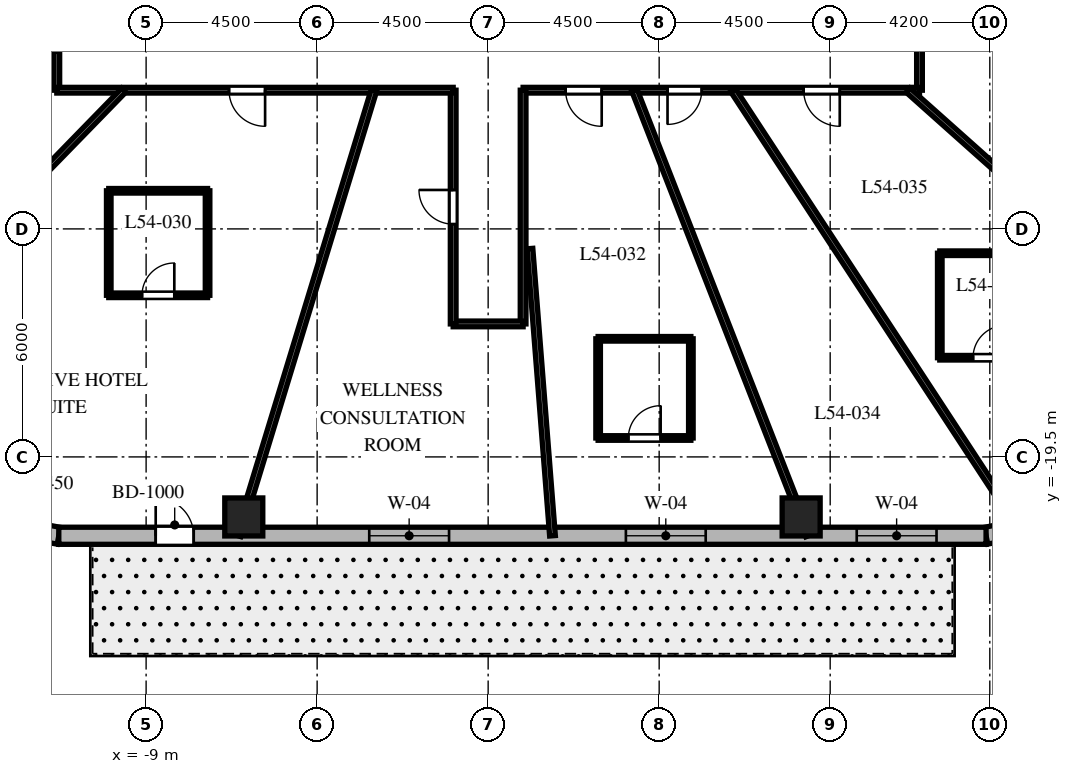
"""IFC4 building model, lengths in metres.
Left out: names, types, materials, properties, quantities, classifications, styles, units other than length and angle.
Written with IfcOpenShell. Run it as: python <this file> out.ifc"""

import sys

from ifc_helpers import new_model, si_unit, direction, frame, frame_2d, origin, origin_2d, place, context, subcontext, project, spatial, rectangle, extrude, element, fill, save


model = new_model("IFC4")
c1 = context("Model", 3, precision=1e-05, world=origin(), true_north=direction((0.0, 1.0)))
c2 = subcontext(c1, "Body", "Model", "MODEL_VIEW")
j1 = project(units=[si_unit("LENGTHUNIT", "METRE"), si_unit("PLANEANGLEUNIT", "RADIAN")], contexts=[c1])
p1 = place(None, origin())
s1 = spatial("IfcSite", under=j1, at=p1, CompositionType="ELEMENT")
p2 = place(p1, origin())
s2 = spatial("IfcBuilding", under=s1, at=p2, CompositionType="ELEMENT")
p3 = place(p2, frame((0.0, 0.0, 217.9)))
s3 = spatial("IfcBuildingStorey", under=s2, at=p3, CompositionType="ELEMENT", Elevation=217.9)
for number, where, z_axis, x_axis in (
    (1, (-6.43, -21.08, 0.0), (0.0, 0.0, 1.0), (1.0, 0.0, 0.0)),
    (2, (8.236, -21.08, 0.0), (0.0, 0.0, 1.0), (1.0, 0.0, 0.0)),
):
    element("IfcColumn", number, at=place(p3, frame(where, z_axis=z_axis, x_axis=x_axis)), inside=s3, PredefinedType="COLUMN", context=c2, shape_type="SweptSolid", body=[
        extrude(rectangle(XDim=1.0, YDim=1.0, at=origin_2d()), origin(), (0.0, 0.0, 1.0), 3.8),
    ])
p4 = place(p3, frame((-12.546, -21.34, 0.0), z_axis=(0.0, 0.0, 1.0), x_axis=(0.982686750835, -0.18527479519, 0.0)))
e3 = element("IfcWall", 3, at=p4, inside=s3, PredefinedType="SOLIDWALL", context=c2, shape_type="SweptSolid", body=[
    extrude(rectangle(XDim=1.27, YDim=0.45, at=frame_2d((0.635, 0.0))), origin(), (0.0, 0.0, 1.0), 3.5),
])
p5 = place(p3, frame((13.102, -21.575, 0.0), z_axis=(0.0, 0.0, 1.0), x_axis=(0.978757421505, 0.205021730188, 0.0)))
e4 = element("IfcWall", 4, at=p5, inside=s3, PredefinedType="SOLIDWALL", context=c2, shape_type="SweptSolid", body=[
    extrude(rectangle(XDim=1.406, YDim=0.45, at=frame_2d((0.703, 0.0))), origin(), (0.0, 0.0, 1.0), 3.5),
])
p6 = place(p3, frame((-11.298, -21.575, 0.0), z_axis=(0.0, 0.0, 1.0), x_axis=(1.0, 0.0, 0.0)))
e5 = element("IfcWall", 5, at=p6, inside=s3, PredefinedType="SOLIDWALL", context=c2, shape_type="SweptSolid", body=[
    extrude(rectangle(XDim=24.399, YDim=0.45, at=frame_2d((12.2, 0.0))), origin(), (0.0, 0.0, 1.0), 3.5),
])
p7 = place(p6, frame((2.55, 0.0, 0.0)))
e6 = element("IfcOpeningElement", 6, at=p7, cuts=e5, PredefinedType="OPENING", context=c2, shape_type="SweptSolid", body=[
    extrude(rectangle(XDim=1.0, YDim=2.15, at=frame_2d((0.5, 1.075))), frame((0.0, 0.235, 0.0), z_axis=(0.0, -1.0, 0.0), x_axis=(1.0, 0.0, 0.0)), (0.0, 0.0, 1.0), 0.47),
])
p8 = place(p6, frame((8.169, 0.0, 0.8)))
e7 = element("IfcOpeningElement", 7, at=p8, cuts=e5, PredefinedType="OPENING", context=c2, shape_type="SweptSolid", body=[
    extrude(rectangle(XDim=2.1, YDim=1.85, at=frame_2d((1.05, 0.925))), frame((0.0, 0.235, 0.0), z_axis=(0.0, -1.0, 0.0), x_axis=(1.0, 0.0, 0.0)), (0.0, 0.0, 1.0), 0.47),
])
p9 = place(p6, frame((14.922, 0.0, 0.8)))
e8 = element("IfcOpeningElement", 8, at=p9, cuts=e5, PredefinedType="OPENING", context=c2, shape_type="SweptSolid", body=[
    extrude(rectangle(XDim=2.1, YDim=1.85, at=frame_2d((1.05, 0.925))), frame((0.0, 0.235, 0.0), z_axis=(0.0, -1.0, 0.0), x_axis=(1.0, 0.0, 0.0)), (0.0, 0.0, 1.0), 0.47),
])
p10 = place(p6, frame((20.996, 0.0, 0.8)))
e9 = element("IfcOpeningElement", 9, at=p10, cuts=e5, PredefinedType="OPENING", context=c2, shape_type="SweptSolid", body=[
    extrude(rectangle(XDim=2.1, YDim=1.85, at=frame_2d((1.05, 0.925))), frame((0.0, 0.235, 0.0), z_axis=(0.0, -1.0, 0.0), x_axis=(1.0, 0.0, 0.0)), (0.0, 0.0, 1.0), 0.47),
])
p11 = place(p3, frame((-11.35, -9.85, 0.0), z_axis=(0.0, 0.0, 1.0), x_axis=(0.0, 1.0, 0.0)))
e10 = element("IfcWall", 10, at=p11, inside=s3, PredefinedType="PARTITIONING", context=c2, shape_type="SweptSolid", body=[
    extrude(rectangle(XDim=12.4, YDim=0.15, at=frame_2d((6.2, 0.0))), origin(), (0.0, 0.0, 1.0), 2.99),
])
p12 = place(p11, frame((10.017, 0.0, 0.0)))
e11 = element("IfcOpeningElement", 11, at=p12, cuts=e10, PredefinedType="OPENING", context=c2, shape_type="SweptSolid", body=[
    extrude(rectangle(XDim=0.9, YDim=2.03, at=frame_2d((0.45, 1.015))), frame((0.0, 0.085, 0.0), z_axis=(0.0, -1.0, 0.0), x_axis=(1.0, 0.0, 0.0)), (0.0, 0.0, 1.0), 0.17),
])
p13 = place(p11, frame((7.427, 0.0, 0.0)))
e12 = element("IfcOpeningElement", 12, at=p13, cuts=e10, PredefinedType="OPENING", context=c2, shape_type="SweptSolid", body=[
    extrude(rectangle(XDim=0.9, YDim=2.03, at=frame_2d((0.45, 1.015))), frame((0.0, 0.085, 0.0), z_axis=(0.0, -1.0, 0.0), x_axis=(1.0, 0.0, 0.0)), (0.0, 0.0, 1.0), 0.17),
])
p14 = place(p11, frame((3.01, 0.0, 0.0)))
e13 = element("IfcOpeningElement", 13, at=p14, cuts=e10, PredefinedType="OPENING", context=c2, shape_type="SweptSolid", body=[
    extrude(rectangle(XDim=0.95, YDim=2.03, at=frame_2d((0.475, 1.015))), frame((0.0, 0.085, 0.0), z_axis=(0.0, -1.0, 0.0), x_axis=(1.0, 0.0, 0.0)), (0.0, 0.0, 1.0), 0.17),
])
p15 = place(p3, frame((11.35, -4.4, 0.0), z_axis=(0.0, 0.0, 1.0), x_axis=(0.0, -1.0, 0.0)))
e14 = element("IfcWall", 14, at=p15, inside=s3, PredefinedType="PARTITIONING", context=c2, shape_type="SweptSolid", body=[
    extrude(rectangle(XDim=5.45, YDim=0.15, at=frame_2d((2.725, 0.0))), origin(), (0.0, 0.0, 1.0), 2.99),
])
p16 = place(p3, frame((11.35, -9.85, 0.0), z_axis=(0.0, 0.0, 1.0), x_axis=(-1.0, 0.0, 0.0)))
e15 = element("IfcWall", 15, at=p16, inside=s3, PredefinedType="PARTITIONING", context=c2, shape_type="SweptSolid", body=[
    extrude(rectangle(XDim=10.43, YDim=0.15, at=frame_2d((5.215, 0.0))), origin(), (0.0, 0.0, 1.0), 2.99),
])
p17 = place(p16, frame((8.362, 0.0, 0.0)))
e16 = element("IfcOpeningElement", 16, at=p17, cuts=e15, PredefinedType="OPENING", context=c2, shape_type="SweptSolid", body=[
    extrude(rectangle(XDim=0.95, YDim=2.03, at=frame_2d((0.475, 1.015))), frame((0.0, 0.085, 0.0), z_axis=(0.0, -1.0, 0.0), x_axis=(1.0, 0.0, 0.0)), (0.0, 0.0, 1.0), 0.17),
])
p18 = place(p16, frame((5.73, 0.0, 0.0)))
e17 = element("IfcOpeningElement", 17, at=p18, cuts=e15, PredefinedType="OPENING", context=c2, shape_type="SweptSolid", body=[
    extrude(rectangle(XDim=0.9, YDim=2.03, at=frame_2d((0.45, 1.015))), frame((0.0, 0.085, 0.0), z_axis=(0.0, -1.0, 0.0), x_axis=(1.0, 0.0, 0.0)), (0.0, 0.0, 1.0), 0.17),
])
p19 = place(p16, frame((2.098, 0.0, 0.0)))
e18 = element("IfcOpeningElement", 18, at=p19, cuts=e15, PredefinedType="OPENING", context=c2, shape_type="SweptSolid", body=[
    extrude(rectangle(XDim=0.95, YDim=2.03, at=frame_2d((0.475, 1.015))), frame((0.0, 0.085, 0.0), z_axis=(0.0, -1.0, 0.0), x_axis=(1.0, 0.0, 0.0)), (0.0, 0.0, 1.0), 0.17),
])
p20 = place(p3, frame((0.92, -9.85, 0.0), z_axis=(0.0, 0.0, 1.0), x_axis=(0.0, -1.0, 0.0)))
e19 = element("IfcWall", 19, at=p20, inside=s3, PredefinedType="PARTITIONING", context=c2, shape_type="SweptSolid", body=[
    extrude(rectangle(XDim=6.15, YDim=0.15, at=frame_2d((3.075, 0.0))), origin(), (0.0, 0.0, 1.0), 3.027),
])
p21 = place(p3, frame((0.92, -16.0, 0.0), z_axis=(0.0, 0.0, 1.0), x_axis=(-1.0, 0.0, 0.0)))
e20 = element("IfcWall", 20, at=p21, inside=s3, PredefinedType="PARTITIONING", context=c2, shape_type="SweptSolid", body=[
    extrude(rectangle(XDim=1.84, YDim=0.15, at=frame_2d((0.92, 0.0))), origin(), (0.0, 0.0, 1.0), 3.5),
])
p22 = place(p3, frame((-0.92, -16.0, 0.0), z_axis=(0.0, 0.0, 1.0), x_axis=(0.0, 1.0, 0.0)))
e21 = element("IfcWall", 21, at=p22, inside=s3, PredefinedType="PARTITIONING", context=c2, shape_type="SweptSolid", body=[
    extrude(rectangle(XDim=6.15, YDim=0.15, at=frame_2d((3.075, 0.0))), origin(), (0.0, 0.0, 1.0), 3.027),
])
p23 = place(p22, frame((2.625, 0.0, 0.0)))
e22 = element("IfcOpeningElement", 22, at=p23, cuts=e21, PredefinedType="OPENING", context=c2, shape_type="SweptSolid", body=[
    extrude(rectangle(XDim=0.9, YDim=2.03, at=frame_2d((0.45, 1.015))), frame((0.0, 0.085, 0.0), z_axis=(0.0, -1.0, 0.0), x_axis=(1.0, 0.0, 0.0)), (0.0, 0.0, 1.0), 0.17),
])
p24 = place(p3, frame((-0.92, -9.85, 0.0), z_axis=(0.0, 0.0, 1.0), x_axis=(-1.0, 0.0, 0.0)))
e23 = element("IfcWall", 23, at=p24, inside=s3, PredefinedType="PARTITIONING", context=c2, shape_type="SweptSolid", body=[
    extrude(rectangle(XDim=10.43, YDim=0.15, at=frame_2d((5.215, 0.0))), origin(), (0.0, 0.0, 1.0), 2.99),
])
p25 = place(p24, frame((4.949, 0.0, 0.0)))
e24 = element("IfcOpeningElement", 24, at=p25, cuts=e23, PredefinedType="OPENING", context=c2, shape_type="SweptSolid", body=[
    extrude(rectangle(XDim=0.95, YDim=2.03, at=frame_2d((0.475, 1.015))), frame((0.0, 0.085, 0.0), z_axis=(0.0, -1.0, 0.0), x_axis=(1.0, 0.0, 0.0)), (0.0, 0.0, 1.0), 0.17),
])
p26 = place(p3, frame((-9.588, -9.85, 0.0), z_axis=(0.0, 0.0, 1.0), x_axis=(-0.697519469595, -0.716565830567, 0.0)))
e25 = element("IfcWall", 25, at=p26, inside=s3, PredefinedType="PARTITIONING", context=c2, shape_type="SweptSolid", body=[
    extrude(rectangle(XDim=9.126, YDim=0.15, at=frame_2d((4.563, 0.0))), origin(), (0.0, 0.0, 1.0), 2.74),
])
p27 = place(p3, frame((-3.004, -9.85, 0.0), z_axis=(0.0, 0.0, 1.0), x_axis=(-0.291775760688, -0.956486751333, 0.0)))
e26 = element("IfcWall", 26, at=p27, inside=s3, PredefinedType="PARTITIONING", context=c2, shape_type="SweptSolid", body=[
    extrude(rectangle(XDim=12.258, YDim=0.15, at=frame_2d((6.129, 0.0))), origin(), (0.0, 0.0, 1.0), 2.74),
])
p28 = place(p3, frame((1.1, -14.018, 0.0), z_axis=(0.0, 0.0, 1.0), x_axis=(0.078228275349, -0.996935472804, 0.0)))
e27 = element("IfcWall", 27, at=p28, inside=s3, PredefinedType="PARTITIONING", context=c2, shape_type="SweptSolid", body=[
    extrude(rectangle(XDim=7.581, YDim=0.15, at=frame_2d((3.79, 0.0))), origin(), (0.0, 0.0, 1.0), 2.74),
])
p29 = place(p3, frame((3.848, -9.85, 0.0), z_axis=(0.0, 0.0, 1.0), x_axis=(0.363921778212, -0.931429513889, 0.0)))
e28 = element("IfcWall", 28, at=p29, inside=s3, PredefinedType="PARTITIONING", context=c2, shape_type="SweptSolid", body=[
    extrude(rectangle(XDim=12.588, YDim=0.15, at=frame_2d((6.294, 0.0))), origin(), (0.0, 0.0, 1.0), 2.74),
])
p30 = place(p3, frame((6.444, -9.85, 0.0), z_axis=(0.0, 0.0, 1.0), x_axis=(0.547492333129, -0.836810698525, 0.0)))
e29 = element("IfcWall", 29, at=p30, inside=s3, PredefinedType="PARTITIONING", context=c2, shape_type="SweptSolid", body=[
    extrude(rectangle(XDim=13.616, YDim=0.15, at=frame_2d((6.808, 0.0))), origin(), (0.0, 0.0, 1.0), 2.74),
])
p31 = place(p3, frame((11.048, -9.85, 0.0), z_axis=(0.0, 0.0, 1.0), x_axis=(0.746444434655, -0.665447748492, 0.0)))
e30 = element("IfcWall", 30, at=p31, inside=s3, PredefinedType="PARTITIONING", context=c2, shape_type="SweptSolid", body=[
    extrude(rectangle(XDim=8.732, YDim=0.15, at=frame_2d((4.366, 0.0))), origin(), (0.0, 0.0, 1.0), 2.74),
])
p32 = place(p3, frame((-9.983, -15.247, 0.0), z_axis=(0.0, 0.0, 1.0), x_axis=(1.0, 0.0, 0.0)))
e31 = element("IfcWall", 31, at=p32, inside=s3, PredefinedType="PARTITIONING", context=c2, shape_type="SweptSolid", body=[
    extrude(rectangle(XDim=2.6, YDim=0.12, at=frame_2d((1.3, 0.0))), origin(), (0.0, 0.0, 1.0), 3.073),
])
p33 = place(p32, frame((0.875, 0.0, 0.0)))
e32 = element("IfcOpeningElement", 32, at=p33, cuts=e31, PredefinedType="OPENING", context=c2, shape_type="SweptSolid", body=[
    extrude(rectangle(XDim=0.85, YDim=2.03, at=frame_2d((0.425, 1.015))), frame((0.0, 0.07, 0.0), z_axis=(0.0, -1.0, 0.0), x_axis=(1.0, 0.0, 0.0)), (0.0, 0.0, 1.0), 0.14),
])
p34 = place(p3, frame((-7.383, -15.247, 0.0), z_axis=(0.0, 0.0, 1.0), x_axis=(0.0, 1.0, 0.0)))
e33 = element("IfcWall", 33, at=p34, inside=s3, PredefinedType="PARTITIONING", context=c2, shape_type="SweptSolid", body=[
    extrude(rectangle(XDim=2.75, YDim=0.12, at=frame_2d((1.375, 0.0))), origin(), (0.0, 0.0, 1.0), 2.941),
])
p35 = place(p3, frame((-7.383, -12.497, 0.0), z_axis=(0.0, 0.0, 1.0), x_axis=(-1.0, 0.0, 0.0)))
e34 = element("IfcWall", 34, at=p35, inside=s3, PredefinedType="PARTITIONING", context=c2, shape_type="SweptSolid", body=[
    extrude(rectangle(XDim=2.6, YDim=0.12, at=frame_2d((1.3, 0.0))), origin(), (0.0, 0.0, 1.0), 2.941),
])
p36 = place(p3, frame((-9.983, -12.497, 0.0), z_axis=(0.0, 0.0, 1.0), x_axis=(0.0, -1.0, 0.0)))
e35 = element("IfcWall", 35, at=p36, inside=s3, PredefinedType="PARTITIONING", context=c2, shape_type="SweptSolid", body=[
    extrude(rectangle(XDim=2.75, YDim=0.12, at=frame_2d((1.375, 0.0))), origin(), (0.0, 0.0, 1.0), 3.073),
])
p37 = place(p3, frame((2.894, -19.002, 0.0), z_axis=(0.0, 0.0, 1.0), x_axis=(1.0, 0.0, 0.0)))
e36 = element("IfcWall", 36, at=p37, inside=s3, PredefinedType="PARTITIONING", context=c2, shape_type="SweptSolid", body=[
    extrude(rectangle(XDim=2.44, YDim=0.12, at=frame_2d((1.22, 0.0))), origin(), (0.0, 0.0, 1.0), 3.5),
])
p38 = place(p37, frame((0.795, 0.0, 0.0)))
e37 = element("IfcOpeningElement", 37, at=p38, cuts=e36, PredefinedType="OPENING", context=c2, shape_type="SweptSolid", body=[
    extrude(rectangle(XDim=0.85, YDim=2.03, at=frame_2d((0.425, 1.015))), frame((0.0, 0.07, 0.0), z_axis=(0.0, -1.0, 0.0), x_axis=(1.0, 0.0, 0.0)), (0.0, 0.0, 1.0), 0.14),
])
p39 = place(p3, frame((5.334, -19.002, 0.0), z_axis=(0.0, 0.0, 1.0), x_axis=(0.0, 1.0, 0.0)))
e38 = element("IfcWall", 38, at=p39, inside=s3, PredefinedType="PARTITIONING", context=c2, shape_type="SweptSolid", body=[
    extrude(rectangle(XDim=2.61, YDim=0.12, at=frame_2d((1.305, 0.0))), origin(), (0.0, 0.0, 1.0), 2.941),
])
p40 = place(p3, frame((5.334, -16.392, 0.0), z_axis=(0.0, 0.0, 1.0), x_axis=(-1.0, 0.0, 0.0)))
e39 = element("IfcWall", 39, at=p40, inside=s3, PredefinedType="PARTITIONING", context=c2, shape_type="SweptSolid", body=[
    extrude(rectangle(XDim=2.44, YDim=0.12, at=frame_2d((1.22, 0.0))), origin(), (0.0, 0.0, 1.0), 3.5),
])
p41 = place(p3, frame((2.894, -16.392, 0.0), z_axis=(0.0, 0.0, 1.0), x_axis=(0.0, -1.0, 0.0)))
e40 = element("IfcWall", 40, at=p41, inside=s3, PredefinedType="PARTITIONING", context=c2, shape_type="SweptSolid", body=[
    extrude(rectangle(XDim=2.61, YDim=0.12, at=frame_2d((1.305, 0.0))), origin(), (0.0, 0.0, 1.0), 2.941),
])
p42 = place(p3, frame((11.884, -16.89, 0.0), z_axis=(0.0, 0.0, 1.0), x_axis=(1.0, 0.0, 0.0)))
e41 = element("IfcWall", 41, at=p42, inside=s3, PredefinedType="PARTITIONING", context=c2, shape_type="SweptSolid", body=[
    extrude(rectangle(XDim=2.6, YDim=0.12, at=frame_2d((1.3, 0.0))), origin(), (0.0, 0.0, 1.0), 2.74),
])
p43 = place(p42, frame((0.875, 0.0, 0.0)))
e42 = element("IfcOpeningElement", 42, at=p43, cuts=e41, PredefinedType="OPENING", context=c2, shape_type="SweptSolid", body=[
    extrude(rectangle(XDim=0.85, YDim=2.03, at=frame_2d((0.425, 1.015))), frame((0.0, 0.07, 0.0), z_axis=(0.0, -1.0, 0.0), x_axis=(1.0, 0.0, 0.0)), (0.0, 0.0, 1.0), 0.14),
])
p44 = place(p3, frame((14.484, -14.14, 0.0), z_axis=(0.0, 0.0, 1.0), x_axis=(-1.0, 0.0, 0.0)))
e43 = element("IfcWall", 43, at=p44, inside=s3, PredefinedType="PARTITIONING", context=c2, shape_type="SweptSolid", body=[
    extrude(rectangle(XDim=2.6, YDim=0.12, at=frame_2d((1.3, 0.0))), origin(), (0.0, 0.0, 1.0), 3.027),
])
p45 = place(p3, frame((11.884, -14.14, 0.0), z_axis=(0.0, 0.0, 1.0), x_axis=(0.0, -1.0, 0.0)))
e44 = element("IfcWall", 44, at=p45, inside=s3, PredefinedType="PARTITIONING", context=c2, shape_type="SweptSolid", body=[
    extrude(rectangle(XDim=2.75, YDim=0.12, at=frame_2d((1.375, 0.0))), origin(), (0.0, 0.0, 1.0), 3.027),
])
p46 = place(p7, origin())
e45 = element("IfcDoor", 45, at=p46, inside=s3, OperationType="SINGLE_SWING_LEFT", PredefinedType="DOOR", context=c2, shape_type="SweptSolid", body=[
    extrude(rectangle(XDim=1.0, YDim=2.15, at=frame_2d((0.5, 1.075))), frame((0.0, 0.025, 0.0), z_axis=(0.0, -1.0, 0.0), x_axis=(1.0, 0.0, 0.0)), (0.0, 0.0, 1.0), 0.05),
])
fill(e6, e45)
p47 = place(p8, origin())
e46 = element("IfcWindow", 46, at=p47, inside=s3, PartitioningType="SINGLE_PANEL", PredefinedType="WINDOW", context=c2, shape_type="SweptSolid", body=[
    extrude(rectangle(XDim=2.1, YDim=1.85, at=frame_2d((1.05, 0.925))), frame((0.0, 0.03, 0.0), z_axis=(0.0, -1.0, 0.0), x_axis=(1.0, 0.0, 0.0)), (0.0, 0.0, 1.0), 0.06),
])
fill(e7, e46)
p48 = place(p9, origin())
e47 = element("IfcWindow", 47, at=p48, inside=s3, PartitioningType="SINGLE_PANEL", PredefinedType="WINDOW", context=c2, shape_type="SweptSolid", body=[
    extrude(rectangle(XDim=2.1, YDim=1.85, at=frame_2d((1.05, 0.925))), frame((0.0, 0.03, 0.0), z_axis=(0.0, -1.0, 0.0), x_axis=(1.0, 0.0, 0.0)), (0.0, 0.0, 1.0), 0.06),
])
fill(e8, e47)
p49 = place(p10, origin())
e48 = element("IfcWindow", 48, at=p49, inside=s3, PartitioningType="SINGLE_PANEL", PredefinedType="WINDOW", context=c2, shape_type="SweptSolid", body=[
    extrude(rectangle(XDim=2.1, YDim=1.85, at=frame_2d((1.05, 0.925))), frame((0.0, 0.03, 0.0), z_axis=(0.0, -1.0, 0.0), x_axis=(1.0, 0.0, 0.0)), (0.0, 0.0, 1.0), 0.06),
])
fill(e9, e48)
p50 = place(p25, origin())
e49 = element("IfcDoor", 49, at=p50, inside=s3, OperationType="SINGLE_SWING_LEFT", PredefinedType="DOOR", context=c2, shape_type="SweptSolid", body=[
    extrude(rectangle(XDim=0.95, YDim=2.03, at=frame_2d((0.475, 1.015))), frame((0.0, 0.025, 0.0), z_axis=(0.0, -1.0, 0.0), x_axis=(1.0, 0.0, 0.0)), (0.0, 0.0, 1.0), 0.05),
])
fill(e24, e49)
p51 = place(p33, origin())
e50 = element("IfcDoor", 50, at=p51, inside=s3, OperationType="SINGLE_SWING_RIGHT", PredefinedType="DOOR", context=c2, shape_type="SweptSolid", body=[
    extrude(rectangle(XDim=0.85, YDim=2.03, at=frame_2d((0.425, 1.015))), frame((0.0, 0.025, 0.0), z_axis=(0.0, -1.0, 0.0), x_axis=(1.0, 0.0, 0.0)), (0.0, 0.0, 1.0), 0.05),
])
fill(e32, e50)
p52 = place(p23, origin())
e51 = element("IfcDoor", 51, at=p52, inside=s3, OperationType="SINGLE_SWING_RIGHT", PredefinedType="DOOR", context=c2, shape_type="SweptSolid", body=[
    extrude(rectangle(XDim=0.9, YDim=2.03, at=frame_2d((0.45, 1.015))), frame((0.0, 0.025, 0.0), z_axis=(0.0, -1.0, 0.0), x_axis=(1.0, 0.0, 0.0)), (0.0, 0.0, 1.0), 0.05),
])
fill(e22, e51)
p53 = place(p17, origin())
e52 = element("IfcDoor", 52, at=p53, inside=s3, OperationType="SINGLE_SWING_LEFT", PredefinedType="DOOR", context=c2, shape_type="SweptSolid", body=[
    extrude(rectangle(XDim=0.95, YDim=2.03, at=frame_2d((0.475, 1.015))), frame((0.0, 0.025, 0.0), z_axis=(0.0, -1.0, 0.0), x_axis=(1.0, 0.0, 0.0)), (0.0, 0.0, 1.0), 0.05),
])
fill(e16, e52)
p54 = place(p38, origin())
e53 = element("IfcDoor", 53, at=p54, inside=s3, OperationType="SINGLE_SWING_RIGHT", PredefinedType="DOOR", context=c2, shape_type="SweptSolid", body=[
    extrude(rectangle(XDim=0.85, YDim=2.03, at=frame_2d((0.425, 1.015))), frame((0.0, 0.025, 0.0), z_axis=(0.0, -1.0, 0.0), x_axis=(1.0, 0.0, 0.0)), (0.0, 0.0, 1.0), 0.05),
])
fill(e37, e53)
p55 = place(p18, origin())
e54 = element("IfcDoor", 54, at=p55, inside=s3, OperationType="SINGLE_SWING_RIGHT", PredefinedType="DOOR", context=c2, shape_type="SweptSolid", body=[
    extrude(rectangle(XDim=0.9, YDim=2.03, at=frame_2d((0.45, 1.015))), frame((0.0, 0.025, 0.0), z_axis=(0.0, -1.0, 0.0), x_axis=(1.0, 0.0, 0.0)), (0.0, 0.0, 1.0), 0.05),
])
fill(e17, e54)
p56 = place(p19, origin())
e55 = element("IfcDoor", 55, at=p56, inside=s3, OperationType="SINGLE_SWING_LEFT", PredefinedType="DOOR", context=c2, shape_type="SweptSolid", body=[
    extrude(rectangle(XDim=0.95, YDim=2.03, at=frame_2d((0.475, 1.015))), frame((0.0, 0.025, 0.0), z_axis=(0.0, -1.0, 0.0), x_axis=(1.0, 0.0, 0.0)), (0.0, 0.0, 1.0), 0.05),
])
fill(e18, e55)
p57 = place(p43, origin())
e56 = element("IfcDoor", 56, at=p57, inside=s3, OperationType="SINGLE_SWING_RIGHT", PredefinedType="DOOR", context=c2, shape_type="SweptSolid", body=[
    extrude(rectangle(XDim=0.85, YDim=2.03, at=frame_2d((0.425, 1.015))), frame((0.0, 0.025, 0.0), z_axis=(0.0, -1.0, 0.0), x_axis=(1.0, 0.0, 0.0)), (0.0, 0.0, 1.0), 0.05),
])
fill(e42, e56)
save(model, sys.argv[1])
